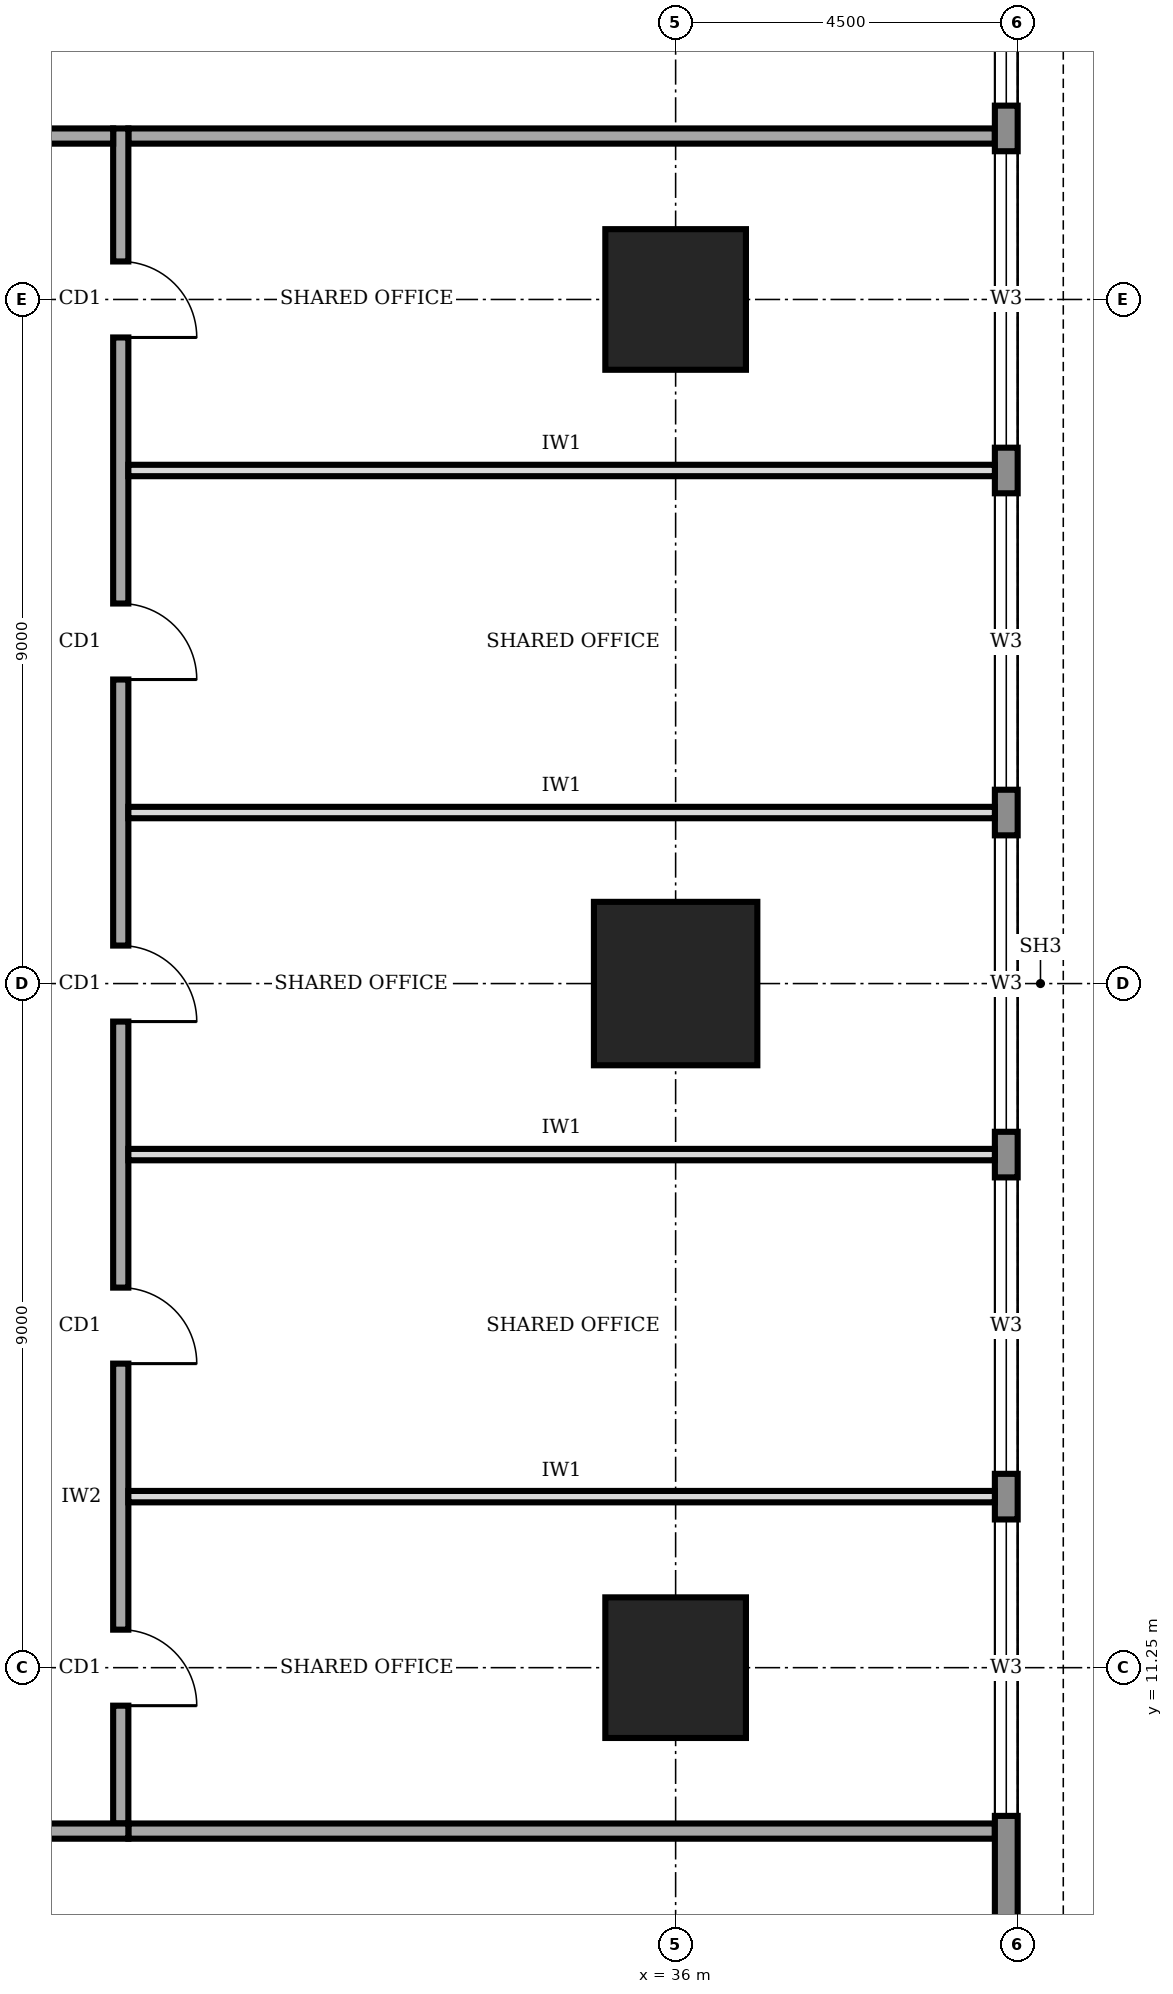
"""IFC4 building model, lengths in metres.
Left out: names, types, materials, properties, quantities, classifications, styles, units other than length and angle.
Written with IfcOpenShell. Run it as: python <this file> out.ifc"""

import sys

from ifc_helpers import new_model, si_unit, direction, frame, frame_2d, origin, origin_2d, place, context, subcontext, project, spatial, rectangle, extrude, element, fill, save


model = new_model("IFC4")
c1 = context("Model", 3, precision=1e-05, world=origin(), true_north=direction((0.0, 1.0)))
c2 = subcontext(c1, "Body", "Model", "MODEL_VIEW")
j1 = project(units=[si_unit("LENGTHUNIT", "METRE"), si_unit("PLANEANGLEUNIT", "RADIAN")], contexts=[c1])
p1 = place(None, origin())
s1 = spatial("IfcSite", under=j1, at=p1, CompositionType="ELEMENT")
p2 = place(p1, origin())
s2 = spatial("IfcBuilding", under=s1, at=p2, CompositionType="ELEMENT")
p3 = place(p2, frame((0.0, 0.0, 261.0)))
s3 = spatial("IfcBuildingStorey", under=s2, at=p3, CompositionType="ELEMENT", Elevation=261.0)
p4 = place(p3, frame((36.0, 11.25, 0.0), z_axis=(0.0, 0.0, 1.0), x_axis=(1.0, 0.0, 0.0)))
e1 = element("IfcColumn", 1, at=p4, inside=s3, PredefinedType="COLUMN", context=c2, shape_type="SweptSolid", body=[
    extrude(rectangle(XDim=1.85, YDim=1.85, at=origin_2d()), origin(), (0.0, 0.0, 1.0), 4.0),
])
p5 = place(p3, frame((36.0, 20.25, 0.0), z_axis=(0.0, 0.0, 1.0), x_axis=(1.0, 0.0, 0.0)))
e2 = element("IfcColumn", 2, at=p5, inside=s3, PredefinedType="COLUMN", context=c2, shape_type="SweptSolid", body=[
    extrude(rectangle(XDim=2.15, YDim=2.15, at=origin_2d()), origin(), (0.0, 0.0, 1.0), 4.0),
])
p6 = place(p3, frame((36.0, 29.25, 0.0), z_axis=(0.0, 0.0, 1.0), x_axis=(1.0, 0.0, 0.0)))
e3 = element("IfcColumn", 3, at=p6, inside=s3, PredefinedType="COLUMN", context=c2, shape_type="SweptSolid", body=[
    extrude(rectangle(XDim=1.85, YDim=1.85, at=origin_2d()), origin(), (0.0, 0.0, 1.0), 4.0),
])
p7 = place(p3, frame((40.35, 4.52, 0.0), z_axis=(0.0, 0.0, 1.0), x_axis=(0.0, 1.0, 0.0)))
e4 = element("IfcWall", 4, at=p7, inside=s3, PredefinedType="STANDARD", context=c2, shape_type="SweptSolid", body=[
    extrude(rectangle(XDim=31.46, YDim=0.3, at=frame_2d((15.73, 0.0))), origin(), (0.0, 0.0, 1.0), 3.75),
])
p8 = place(p7, frame((4.78, 0.0, 0.95)))
e5 = element("IfcOpeningElement", 5, at=p8, cuts=e4, PredefinedType="OPENING", context=c2, shape_type="SweptSolid", body=[
    extrude(rectangle(XDim=3.9, YDim=1.8, at=frame_2d((1.95, 0.9))), frame((0.0, 0.16, 0.0), z_axis=(0.0, -1.0, 0.0), x_axis=(1.0, 0.0, 0.0)), (0.0, 0.0, 1.0), 0.32),
])
p9 = place(p7, frame((9.28, 0.0, 0.95)))
e6 = element("IfcOpeningElement", 6, at=p9, cuts=e4, PredefinedType="OPENING", context=c2, shape_type="SweptSolid", body=[
    extrude(rectangle(XDim=3.9, YDim=1.8, at=frame_2d((1.95, 0.9))), frame((0.0, 0.16, 0.0), z_axis=(0.0, -1.0, 0.0), x_axis=(1.0, 0.0, 0.0)), (0.0, 0.0, 1.0), 0.32),
])
p10 = place(p7, frame((13.78, 0.0, 0.95)))
e7 = element("IfcOpeningElement", 7, at=p10, cuts=e4, PredefinedType="OPENING", context=c2, shape_type="SweptSolid", body=[
    extrude(rectangle(XDim=3.9, YDim=1.8, at=frame_2d((1.95, 0.9))), frame((0.0, 0.16, 0.0), z_axis=(0.0, -1.0, 0.0), x_axis=(1.0, 0.0, 0.0)), (0.0, 0.0, 1.0), 0.32),
])
p11 = place(p7, frame((18.28, 0.0, 0.95)))
e8 = element("IfcOpeningElement", 8, at=p11, cuts=e4, PredefinedType="OPENING", context=c2, shape_type="SweptSolid", body=[
    extrude(rectangle(XDim=3.9, YDim=1.8, at=frame_2d((1.95, 0.9))), frame((0.0, 0.16, 0.0), z_axis=(0.0, -1.0, 0.0), x_axis=(1.0, 0.0, 0.0)), (0.0, 0.0, 1.0), 0.32),
])
p12 = place(p7, frame((22.78, 0.0, 0.95)))
e9 = element("IfcOpeningElement", 9, at=p12, cuts=e4, PredefinedType="OPENING", context=c2, shape_type="SweptSolid", body=[
    extrude(rectangle(XDim=3.9, YDim=1.8, at=frame_2d((1.95, 0.9))), frame((0.0, 0.16, 0.0), z_axis=(0.0, -1.0, 0.0), x_axis=(1.0, 0.0, 0.0)), (0.0, 0.0, 1.0), 0.32),
])
p13 = place(p7, frame((27.28, 0.0, 0.95)))
e10 = element("IfcOpeningElement", 10, at=p13, cuts=e4, PredefinedType="OPENING", context=c2, shape_type="SweptSolid", body=[
    extrude(rectangle(XDim=3.9, YDim=1.8, at=frame_2d((1.95, 0.9))), frame((0.0, 0.16, 0.0), z_axis=(0.0, -1.0, 0.0), x_axis=(1.0, 0.0, 0.0)), (0.0, 0.0, 1.0), 0.32),
])
p14 = place(p3, frame((11.9, 9.1, 0.0), z_axis=(0.0, 0.0, 1.0), x_axis=(1.0, 0.0, 0.0)))
e11 = element("IfcWall", 11, at=p14, inside=s3, PredefinedType="SOLIDWALL", context=c2, shape_type="SweptSolid", body=[
    extrude(rectangle(XDim=16.9, YDim=0.2, at=frame_2d((8.45, 0.0))), origin(), (0.0, 0.0, 1.0), 3.75),
])
p15 = place(p14, frame((2.25, 0.0, 0.0)))
e12 = element("IfcOpeningElement", 12, at=p15, cuts=e11, PredefinedType="OPENING", context=c2, shape_type="SweptSolid", body=[
    extrude(rectangle(XDim=1.4, YDim=2.1, at=frame_2d((0.7, 1.05))), frame((0.0, 0.11, 0.0), z_axis=(0.0, -1.0, 0.0), x_axis=(1.0, 0.0, 0.0)), (0.0, 0.0, 1.0), 0.22),
])
p16 = place(p14, frame((10.8, 0.0, 0.0)))
e13 = element("IfcOpeningElement", 13, at=p16, cuts=e11, PredefinedType="OPENING", context=c2, shape_type="SweptSolid", body=[
    extrude(rectangle(XDim=1.4, YDim=2.1, at=frame_2d((0.7, 1.05))), frame((0.0, 0.11, 0.0), z_axis=(0.0, -1.0, 0.0), x_axis=(1.0, 0.0, 0.0)), (0.0, 0.0, 1.0), 0.22),
])
p17 = place(p3, frame((28.7, 9.2, 0.0), z_axis=(0.0, 0.0, 1.0), x_axis=(0.0, 1.0, 0.0)))
e14 = element("IfcWall", 14, at=p17, inside=s3, PredefinedType="SOLIDWALL", context=c2, shape_type="SweptSolid", body=[
    extrude(rectangle(XDim=22.3, YDim=0.2, at=frame_2d((11.15, 0.0))), origin(), (0.0, 0.0, 1.0), 3.75),
])
p18 = place(p17, frame((1.55, 0.0, 0.0)))
e15 = element("IfcOpeningElement", 15, at=p18, cuts=e14, PredefinedType="OPENING", context=c2, shape_type="SweptSolid", body=[
    extrude(rectangle(XDim=1.0, YDim=2.1, at=frame_2d((0.5, 1.05))), frame((0.0, 0.11, 0.0), z_axis=(0.0, -1.0, 0.0), x_axis=(1.0, 0.0, 0.0)), (0.0, 0.0, 1.0), 0.22),
])
p19 = place(p17, frame((6.05, 0.0, 0.0)))
e16 = element("IfcOpeningElement", 16, at=p19, cuts=e14, PredefinedType="OPENING", context=c2, shape_type="SweptSolid", body=[
    extrude(rectangle(XDim=1.0, YDim=2.1, at=frame_2d((0.5, 1.05))), frame((0.0, 0.11, 0.0), z_axis=(0.0, -1.0, 0.0), x_axis=(1.0, 0.0, 0.0)), (0.0, 0.0, 1.0), 0.22),
])
p20 = place(p17, frame((10.55, 0.0, 0.0)))
e17 = element("IfcOpeningElement", 17, at=p20, cuts=e14, PredefinedType="OPENING", context=c2, shape_type="SweptSolid", body=[
    extrude(rectangle(XDim=1.0, YDim=2.1, at=frame_2d((0.5, 1.05))), frame((0.0, 0.11, 0.0), z_axis=(0.0, -1.0, 0.0), x_axis=(1.0, 0.0, 0.0)), (0.0, 0.0, 1.0), 0.22),
])
p21 = place(p17, frame((15.05, 0.0, 0.0)))
e18 = element("IfcOpeningElement", 18, at=p21, cuts=e14, PredefinedType="OPENING", context=c2, shape_type="SweptSolid", body=[
    extrude(rectangle(XDim=1.0, YDim=2.1, at=frame_2d((0.5, 1.05))), frame((0.0, 0.11, 0.0), z_axis=(0.0, -1.0, 0.0), x_axis=(1.0, 0.0, 0.0)), (0.0, 0.0, 1.0), 0.22),
])
p22 = place(p17, frame((19.55, 0.0, 0.0)))
e19 = element("IfcOpeningElement", 19, at=p22, cuts=e14, PredefinedType="OPENING", context=c2, shape_type="SweptSolid", body=[
    extrude(rectangle(XDim=1.0, YDim=2.1, at=frame_2d((0.5, 1.05))), frame((0.0, 0.11, 0.0), z_axis=(0.0, -1.0, 0.0), x_axis=(1.0, 0.0, 0.0)), (0.0, 0.0, 1.0), 0.22),
])
p23 = place(p3, frame((28.6, 31.4, 0.0), z_axis=(0.0, 0.0, 1.0), x_axis=(-1.0, 0.0, 0.0)))
e20 = element("IfcWall", 20, at=p23, inside=s3, PredefinedType="SOLIDWALL", context=c2, shape_type="SweptSolid", body=[
    extrude(rectangle(XDim=16.9, YDim=0.2, at=frame_2d((8.45, 0.0))), origin(), (0.0, 0.0, 1.0), 3.75),
])
p24 = place(p23, frame((15.425, 0.0, 0.0)))
e21 = element("IfcOpeningElement", 21, at=p24, cuts=e20, PredefinedType="OPENING", context=c2, shape_type="SweptSolid", body=[
    extrude(rectangle(XDim=1.0, YDim=2.1, at=frame_2d((0.5, 1.05))), frame((0.0, 0.11, 0.0), z_axis=(0.0, -1.0, 0.0), x_axis=(1.0, 0.0, 0.0)), (0.0, 0.0, 1.0), 0.22),
])
p25 = place(p23, frame((10.1, 0.0, 0.0)))
e22 = element("IfcOpeningElement", 22, at=p25, cuts=e20, PredefinedType="OPENING", context=c2, shape_type="SweptSolid", body=[
    extrude(rectangle(XDim=1.0, YDim=2.1, at=frame_2d((0.5, 1.05))), frame((0.0, 0.11, 0.0), z_axis=(0.0, -1.0, 0.0), x_axis=(1.0, 0.0, 0.0)), (0.0, 0.0, 1.0), 0.22),
])
p26 = place(p23, frame((2.25, 0.0, 0.0)))
e23 = element("IfcOpeningElement", 23, at=p26, cuts=e20, PredefinedType="OPENING", context=c2, shape_type="SweptSolid", body=[
    extrude(rectangle(XDim=1.4, YDim=2.1, at=frame_2d((0.7, 1.05))), frame((0.0, 0.11, 0.0), z_axis=(0.0, -1.0, 0.0), x_axis=(1.0, 0.0, 0.0)), (0.0, 0.0, 1.0), 0.22),
])
for number, where, z_axis, x_axis in (
    (24, (28.8, 9.1, 0.0), (0.0, 0.0, 1.0), (1.0, 0.0, 0.0)),
    (25, (28.8, 31.4, 0.0), (0.0, 0.0, 1.0), (1.0, 0.0, 0.0)),
):
    element("IfcWall", number, at=place(p3, frame(where, z_axis=z_axis, x_axis=x_axis)), inside=s3, PredefinedType="SOLIDWALL", context=c2, shape_type="SweptSolid", body=[
        extrude(rectangle(XDim=11.4, YDim=0.2, at=frame_2d((5.7, 0.0))), origin(), (0.0, 0.0, 1.0), 3.75),
    ])
for number, where, z_axis, x_axis in (
    (26, (28.8, 13.5, 0.0), (0.0, 0.0, 1.0), (1.0, 0.0, 0.0)),
    (27, (28.8, 18.0, 0.0), (0.0, 0.0, 1.0), (1.0, 0.0, 0.0)),
    (28, (28.8, 22.5, 0.0), (0.0, 0.0, 1.0), (1.0, 0.0, 0.0)),
    (29, (28.8, 27.0, 0.0), (0.0, 0.0, 1.0), (1.0, 0.0, 0.0)),
):
    element("IfcWall", number, at=place(p3, frame(where, z_axis=z_axis, x_axis=x_axis)), inside=s3, PredefinedType="PARTITIONING", context=c2, shape_type="SweptSolid", body=[
        extrude(rectangle(XDim=11.4, YDim=0.15, at=frame_2d((5.7, 0.0))), origin(), (0.0, 0.0, 1.0), 3.75),
    ])
p27 = place(p8, origin())
e30 = element("IfcWindow", 30, at=p27, inside=s3, PartitioningType="SINGLE_PANEL", PredefinedType="WINDOW", context=c2, shape_type="SweptSolid", body=[
    extrude(rectangle(XDim=3.9, YDim=1.8, at=frame_2d((1.95, 0.9))), frame((0.0, 0.03, 0.0), z_axis=(0.0, -1.0, 0.0), x_axis=(1.0, 0.0, 0.0)), (0.0, 0.0, 1.0), 0.06),
])
fill(e5, e30)
p28 = place(p9, origin())
e31 = element("IfcWindow", 31, at=p28, inside=s3, PartitioningType="SINGLE_PANEL", PredefinedType="WINDOW", context=c2, shape_type="SweptSolid", body=[
    extrude(rectangle(XDim=3.9, YDim=1.8, at=frame_2d((1.95, 0.9))), frame((0.0, 0.03, 0.0), z_axis=(0.0, -1.0, 0.0), x_axis=(1.0, 0.0, 0.0)), (0.0, 0.0, 1.0), 0.06),
])
fill(e6, e31)
p29 = place(p10, origin())
e32 = element("IfcWindow", 32, at=p29, inside=s3, PartitioningType="SINGLE_PANEL", PredefinedType="WINDOW", context=c2, shape_type="SweptSolid", body=[
    extrude(rectangle(XDim=3.9, YDim=1.8, at=frame_2d((1.95, 0.9))), frame((0.0, 0.03, 0.0), z_axis=(0.0, -1.0, 0.0), x_axis=(1.0, 0.0, 0.0)), (0.0, 0.0, 1.0), 0.06),
])
fill(e7, e32)
p30 = place(p11, origin())
e33 = element("IfcWindow", 33, at=p30, inside=s3, PartitioningType="SINGLE_PANEL", PredefinedType="WINDOW", context=c2, shape_type="SweptSolid", body=[
    extrude(rectangle(XDim=3.9, YDim=1.8, at=frame_2d((1.95, 0.9))), frame((0.0, 0.03, 0.0), z_axis=(0.0, -1.0, 0.0), x_axis=(1.0, 0.0, 0.0)), (0.0, 0.0, 1.0), 0.06),
])
fill(e8, e33)
p31 = place(p12, origin())
e34 = element("IfcWindow", 34, at=p31, inside=s3, PartitioningType="SINGLE_PANEL", PredefinedType="WINDOW", context=c2, shape_type="SweptSolid", body=[
    extrude(rectangle(XDim=3.9, YDim=1.8, at=frame_2d((1.95, 0.9))), frame((0.0, 0.03, 0.0), z_axis=(0.0, -1.0, 0.0), x_axis=(1.0, 0.0, 0.0)), (0.0, 0.0, 1.0), 0.06),
])
fill(e9, e34)
p32 = place(p13, origin())
e35 = element("IfcWindow", 35, at=p32, inside=s3, PartitioningType="SINGLE_PANEL", PredefinedType="WINDOW", context=c2, shape_type="SweptSolid", body=[
    extrude(rectangle(XDim=3.9, YDim=1.8, at=frame_2d((1.95, 0.9))), frame((0.0, 0.03, 0.0), z_axis=(0.0, -1.0, 0.0), x_axis=(1.0, 0.0, 0.0)), (0.0, 0.0, 1.0), 0.06),
])
fill(e10, e35)
p33 = place(p18, frame((1.0, 0.0, 0.0), z_axis=(0.0, 0.0, 1.0), x_axis=(-1.0, 0.0, 0.0)))
e36 = element("IfcDoor", 36, at=p33, inside=s3, OperationType="SINGLE_SWING_RIGHT", PredefinedType="DOOR", context=c2, shape_type="SweptSolid", body=[
    extrude(rectangle(XDim=1.0, YDim=2.1, at=frame_2d((0.5, 1.05))), frame((0.0, 0.025, 0.0), z_axis=(0.0, -1.0, 0.0), x_axis=(1.0, 0.0, 0.0)), (0.0, 0.0, 1.0), 0.05),
])
fill(e15, e36)
p34 = place(p19, frame((1.0, 0.0, 0.0), z_axis=(0.0, 0.0, 1.0), x_axis=(-1.0, 0.0, 0.0)))
e37 = element("IfcDoor", 37, at=p34, inside=s3, OperationType="SINGLE_SWING_RIGHT", PredefinedType="DOOR", context=c2, shape_type="SweptSolid", body=[
    extrude(rectangle(XDim=1.0, YDim=2.1, at=frame_2d((0.5, 1.05))), frame((0.0, 0.025, 0.0), z_axis=(0.0, -1.0, 0.0), x_axis=(1.0, 0.0, 0.0)), (0.0, 0.0, 1.0), 0.05),
])
fill(e16, e37)
p35 = place(p20, frame((1.0, 0.0, 0.0), z_axis=(0.0, 0.0, 1.0), x_axis=(-1.0, 0.0, 0.0)))
e38 = element("IfcDoor", 38, at=p35, inside=s3, OperationType="SINGLE_SWING_RIGHT", PredefinedType="DOOR", context=c2, shape_type="SweptSolid", body=[
    extrude(rectangle(XDim=1.0, YDim=2.1, at=frame_2d((0.5, 1.05))), frame((0.0, 0.025, 0.0), z_axis=(0.0, -1.0, 0.0), x_axis=(1.0, 0.0, 0.0)), (0.0, 0.0, 1.0), 0.05),
])
fill(e17, e38)
p36 = place(p21, frame((1.0, 0.0, 0.0), z_axis=(0.0, 0.0, 1.0), x_axis=(-1.0, 0.0, 0.0)))
e39 = element("IfcDoor", 39, at=p36, inside=s3, OperationType="SINGLE_SWING_RIGHT", PredefinedType="DOOR", context=c2, shape_type="SweptSolid", body=[
    extrude(rectangle(XDim=1.0, YDim=2.1, at=frame_2d((0.5, 1.05))), frame((0.0, 0.025, 0.0), z_axis=(0.0, -1.0, 0.0), x_axis=(1.0, 0.0, 0.0)), (0.0, 0.0, 1.0), 0.05),
])
fill(e18, e39)
p37 = place(p22, frame((1.0, 0.0, 0.0), z_axis=(0.0, 0.0, 1.0), x_axis=(-1.0, 0.0, 0.0)))
e40 = element("IfcDoor", 40, at=p37, inside=s3, OperationType="SINGLE_SWING_RIGHT", PredefinedType="DOOR", context=c2, shape_type="SweptSolid", body=[
    extrude(rectangle(XDim=1.0, YDim=2.1, at=frame_2d((0.5, 1.05))), frame((0.0, 0.025, 0.0), z_axis=(0.0, -1.0, 0.0), x_axis=(1.0, 0.0, 0.0)), (0.0, 0.0, 1.0), 0.05),
])
fill(e19, e40)
save(model, sys.argv[1])
